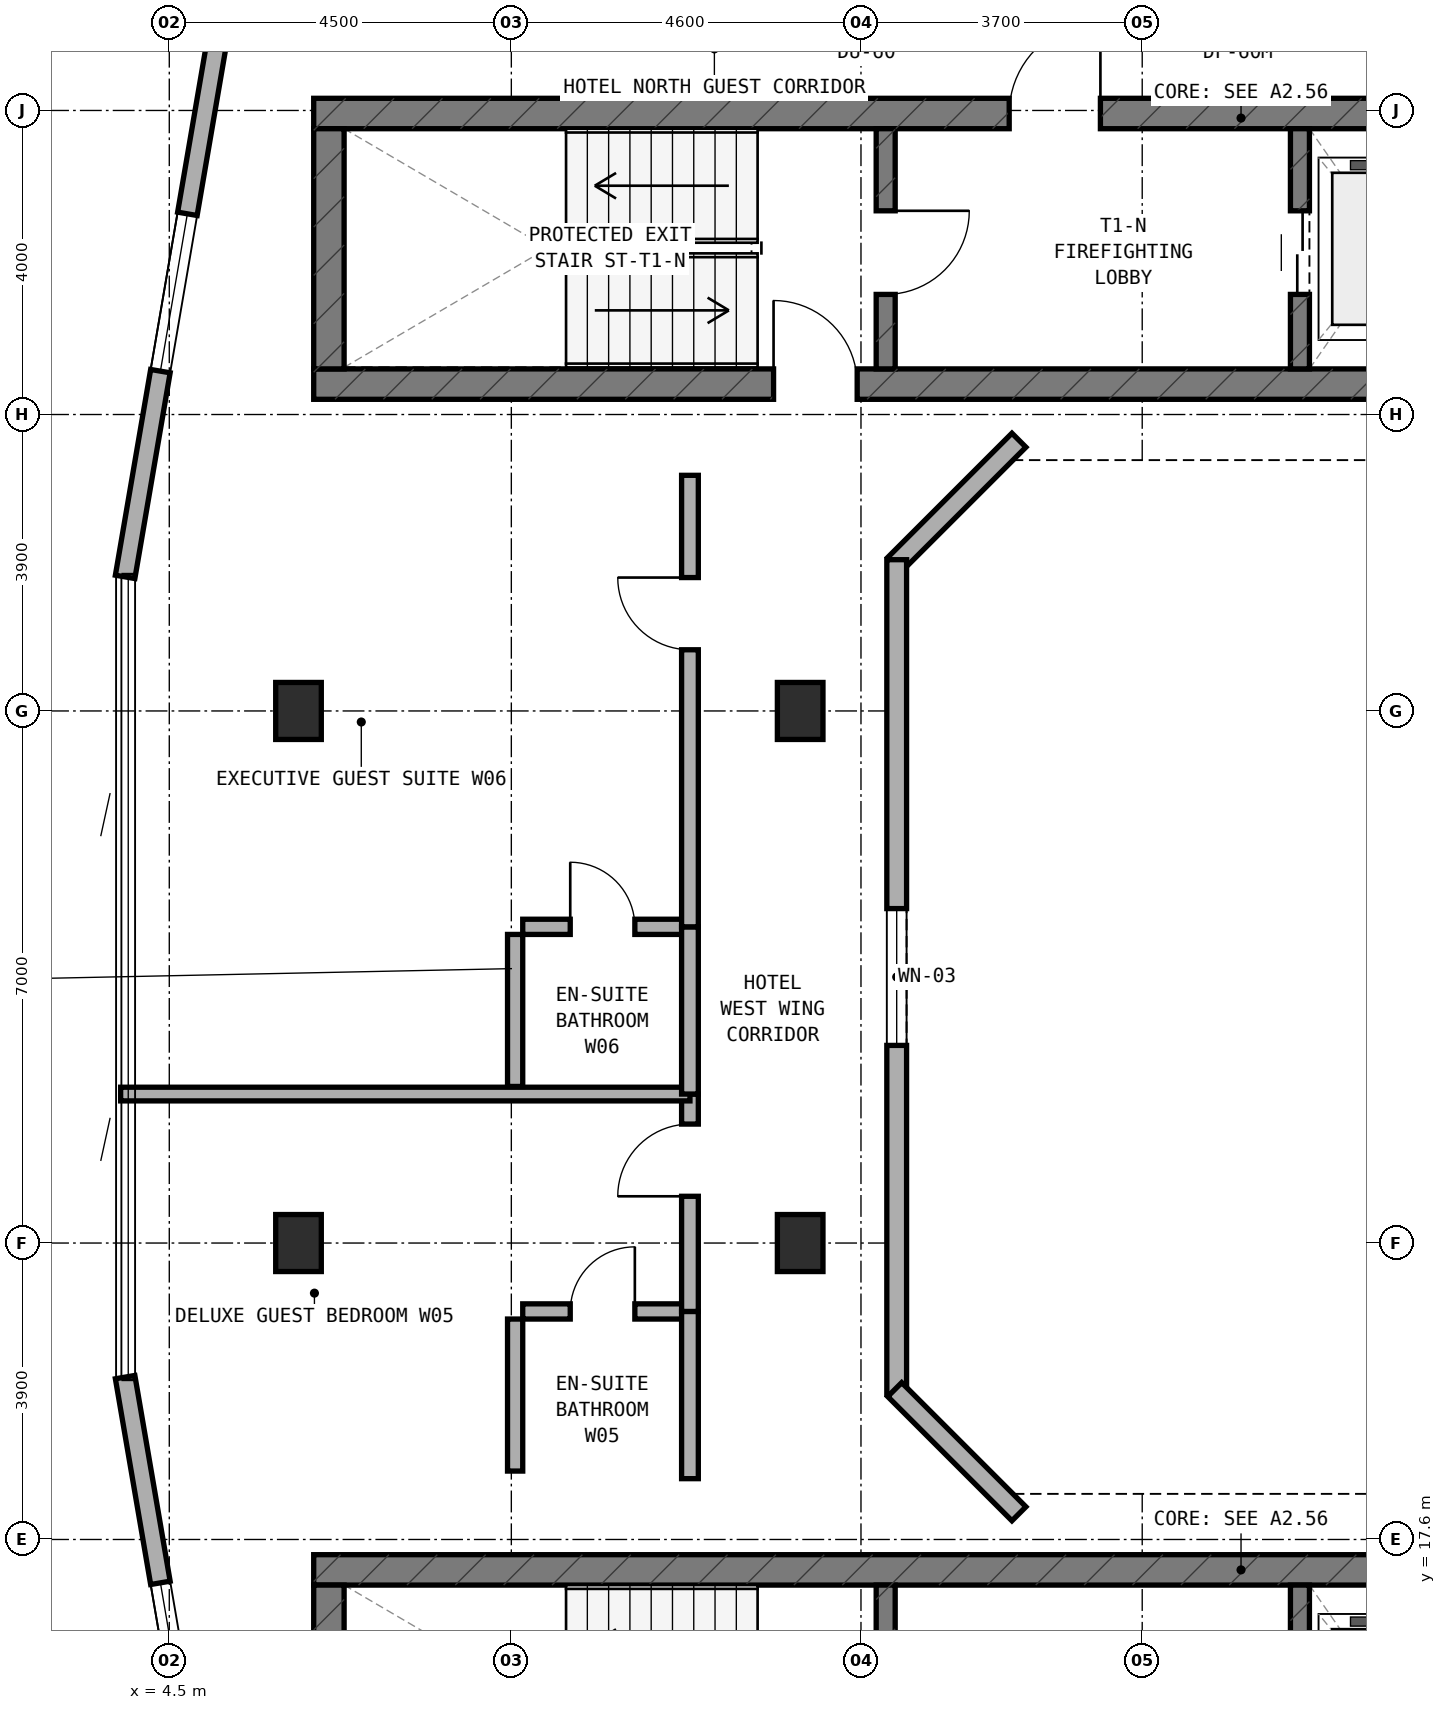
"""IFC4 building model, lengths in metres.
Left out: names, types, materials, properties, quantities, classifications, styles, units other than length and angle.
Written with IfcOpenShell. Run it as: python <this file> out.ifc"""

import sys

from ifc_helpers import new_model, si_unit, direction, frame, frame_2d, origin, origin_2d, place, context, subcontext, project, spatial, rectangle, extrude, element, fill, save


model = new_model("IFC4")
c1 = context("Model", 3, precision=1e-05, world=origin(), true_north=direction((0.0, 1.0)))
c2 = subcontext(c1, "Body", "Model", "MODEL_VIEW")
j1 = project(units=[si_unit("LENGTHUNIT", "METRE"), si_unit("PLANEANGLEUNIT", "RADIAN")], contexts=[c1])
p1 = place(None, origin())
s1 = spatial("IfcSite", under=j1, at=p1, CompositionType="ELEMENT")
p2 = place(p1, origin())
s2 = spatial("IfcBuilding", under=s1, at=p2, CompositionType="ELEMENT")
p3 = place(p2, frame((0.0, 0.0, 257.6)))
s3 = spatial("IfcBuildingStorey", under=s2, at=p3, CompositionType="ELEMENT", Elevation=257.6)
p4 = place(p3, frame((6.4, 32.8, 0.0), z_axis=(0.0, 0.0, 1.0), x_axis=(1.0, 0.0, 0.0)))
e1 = element("IfcWall", 1, at=p4, inside=s3, PredefinedType="SHEAR", context=c2, shape_type="SweptSolid", body=[
    extrude(rectangle(XDim=24.4, YDim=0.4, at=frame_2d((12.2, 0.0))), origin(), (0.0, 0.0, 1.0), 3.6),
])
p5 = place(p4, frame((6.05, 0.0, 0.0)))
e2 = element("IfcOpeningElement", 2, at=p5, cuts=e1, PredefinedType="OPENING", context=c2, shape_type="SweptSolid", body=[
    extrude(rectangle(XDim=1.1, YDim=2.15, at=frame_2d((0.55, 1.075))), frame((0.0, 0.21, 0.0), z_axis=(0.0, -1.0, 0.0), x_axis=(1.0, 0.0, 0.0)), (0.0, 0.0, 1.0), 0.42),
])
p6 = place(p3, frame((6.4, 36.36, 0.0), z_axis=(0.0, 0.0, 1.0), x_axis=(1.0, 0.0, 0.0)))
e3 = element("IfcWall", 3, at=p6, inside=s3, PredefinedType="SHEAR", context=c2, shape_type="SweptSolid", body=[
    extrude(rectangle(XDim=24.4, YDim=0.4, at=frame_2d((12.2, 0.0))), origin(), (0.0, 0.0, 1.0), 3.6),
])
p7 = place(p6, frame((9.15, 0.0, 0.0)))
e4 = element("IfcOpeningElement", 4, at=p7, cuts=e3, PredefinedType="OPENING", context=c2, shape_type="SweptSolid", body=[
    extrude(rectangle(XDim=1.2, YDim=2.15, at=frame_2d((0.6, 1.075))), frame((0.0, 0.21, 0.0), z_axis=(0.0, -1.0, 0.0), x_axis=(1.0, 0.0, 0.0)), (0.0, 0.0, 1.0), 0.42),
])
p8 = place(p6, frame((19.2, 0.0, 0.0)))
e5 = element("IfcOpeningElement", 5, at=p8, cuts=e3, PredefinedType="OPENING", context=c2, shape_type="SweptSolid", body=[
    extrude(rectangle(XDim=0.85, YDim=2.1, at=frame_2d((0.425, 1.05))), frame((0.0, 0.21, 0.0), z_axis=(0.0, -1.0, 0.0), x_axis=(1.0, 0.0, 0.0)), (0.0, 0.0, 1.0), 0.42),
])
p9 = place(p6, frame((16.94, 0.0, 0.0)))
e6 = element("IfcOpeningElement", 6, at=p9, cuts=e3, PredefinedType="OPENING", context=c2, shape_type="SweptSolid", body=[
    extrude(rectangle(XDim=0.85, YDim=2.1, at=frame_2d((0.425, 1.05))), frame((0.0, 0.21, 0.0), z_axis=(0.0, -1.0, 0.0), x_axis=(1.0, 0.0, 0.0)), (0.0, 0.0, 1.0), 0.42),
])
p10 = place(p3, frame((6.6, 33.0, 0.0), z_axis=(0.0, 0.0, 1.0), x_axis=(0.0, 1.0, 0.0)))
e7 = element("IfcWall", 7, at=p10, inside=s3, PredefinedType="SHEAR", context=c2, shape_type="SweptSolid", body=[
    extrude(rectangle(XDim=3.16, YDim=0.4, at=frame_2d((1.58, 0.0))), origin(), (0.0, 0.0, 1.0), 3.6),
])
p11 = place(p3, frame((13.925, 33.0, 0.0), z_axis=(0.0, 0.0, 1.0), x_axis=(0.0, 1.0, 0.0)))
e8 = element("IfcWall", 8, at=p11, inside=s3, PredefinedType="STANDARD", context=c2, shape_type="SweptSolid", body=[
    extrude(rectangle(XDim=3.16, YDim=0.25, at=frame_2d((1.58, 0.0))), origin(), (0.0, 0.0, 1.0), 3.32),
])
p12 = place(p11, frame((0.98, 0.0, 0.0)))
e9 = element("IfcOpeningElement", 9, at=p12, cuts=e8, PredefinedType="OPENING", context=c2, shape_type="SweptSolid", body=[
    extrude(rectangle(XDim=1.1, YDim=2.15, at=frame_2d((0.55, 1.075))), frame((0.0, 0.135, 0.0), z_axis=(0.0, -1.0, 0.0), x_axis=(1.0, 0.0, 0.0)), (0.0, 0.0, 1.0), 0.27),
])
p13 = place(p3, frame((19.375, 33.0, 0.0), z_axis=(0.0, 0.0, 1.0), x_axis=(0.0, 1.0, 0.0)))
e10 = element("IfcWall", 10, at=p13, inside=s3, PredefinedType="STANDARD", context=c2, shape_type="SweptSolid", body=[
    extrude(rectangle(XDim=3.16, YDim=0.25, at=frame_2d((1.58, 0.0))), origin(), (0.0, 0.0, 1.0), 3.32),
])
p14 = place(p13, frame((0.98, 0.0, 0.0)))
e11 = element("IfcOpeningElement", 11, at=p14, cuts=e10, PredefinedType="OPENING", context=c2, shape_type="SweptSolid", body=[
    extrude(rectangle(XDim=1.1, YDim=2.15, at=frame_2d((0.55, 1.075))), frame((0.0, 0.135, 0.0), z_axis=(0.0, -1.0, 0.0), x_axis=(1.0, 0.0, 0.0)), (0.0, 0.0, 1.0), 0.27),
])
p15 = place(p3, frame((6.4, 17.2, 0.0), z_axis=(0.0, 0.0, 1.0), x_axis=(1.0, 0.0, 0.0)))
e12 = element("IfcWall", 12, at=p15, inside=s3, PredefinedType="SHEAR", context=c2, shape_type="SweptSolid", body=[
    extrude(rectangle(XDim=24.4, YDim=0.4, at=frame_2d((12.2, 0.0))), origin(), (0.0, 0.0, 1.0), 3.6),
])
p16 = place(p3, frame((6.6, 13.84, 0.0), z_axis=(0.0, 0.0, 1.0), x_axis=(0.0, 1.0, 0.0)))
e13 = element("IfcWall", 13, at=p16, inside=s3, PredefinedType="SHEAR", context=c2, shape_type="SweptSolid", body=[
    extrude(rectangle(XDim=3.16, YDim=0.4, at=frame_2d((1.58, 0.0))), origin(), (0.0, 0.0, 1.0), 3.6),
])
p17 = place(p3, frame((13.925, 13.84, 0.0), z_axis=(0.0, 0.0, 1.0), x_axis=(0.0, 1.0, 0.0)))
e14 = element("IfcWall", 14, at=p17, inside=s3, PredefinedType="STANDARD", context=c2, shape_type="SweptSolid", body=[
    extrude(rectangle(XDim=3.16, YDim=0.25, at=frame_2d((1.58, 0.0))), origin(), (0.0, 0.0, 1.0), 3.32),
])
p18 = place(p17, frame((0.98, 0.0, 0.0)))
e15 = element("IfcOpeningElement", 15, at=p18, cuts=e14, PredefinedType="OPENING", context=c2, shape_type="SweptSolid", body=[
    extrude(rectangle(XDim=1.1, YDim=2.15, at=frame_2d((0.55, 1.075))), frame((0.0, 0.135, 0.0), z_axis=(0.0, -1.0, 0.0), x_axis=(1.0, 0.0, 0.0)), (0.0, 0.0, 1.0), 0.27),
])
p19 = place(p3, frame((19.375, 13.84, 0.0), z_axis=(0.0, 0.0, 1.0), x_axis=(0.0, 1.0, 0.0)))
e16 = element("IfcWall", 16, at=p19, inside=s3, PredefinedType="STANDARD", context=c2, shape_type="SweptSolid", body=[
    extrude(rectangle(XDim=3.16, YDim=0.25, at=frame_2d((1.58, 0.0))), origin(), (0.0, 0.0, 1.0), 3.32),
])
p20 = place(p19, frame((0.98, 0.0, 0.0)))
e17 = element("IfcOpeningElement", 17, at=p20, cuts=e16, PredefinedType="OPENING", context=c2, shape_type="SweptSolid", body=[
    extrude(rectangle(XDim=1.1, YDim=2.15, at=frame_2d((0.55, 1.075))), frame((0.0, 0.135, 0.0), z_axis=(0.0, -1.0, 0.0), x_axis=(1.0, 0.0, 0.0)), (0.0, 0.0, 1.0), 0.27),
])
for number, where, z_axis, x_axis in (
    (18, (6.2, 21.5, 0.0), (0.0, 0.0, 1.0), (1.0, 0.0, 0.0)),
    (19, (6.2, 28.5, 0.0), (0.0, 0.0, 1.0), (1.0, 0.0, 0.0)),
    (20, (12.8, 21.5, 0.0), (0.0, 0.0, 1.0), (1.0, 0.0, 0.0)),
    (21, (12.8, 28.5, 0.0), (0.0, 0.0, 1.0), (1.0, 0.0, 0.0)),
):
    element("IfcColumn", number, at=place(p3, frame(where, z_axis=z_axis, x_axis=x_axis)), inside=s3, PredefinedType="COLUMN", context=c2, shape_type="SweptSolid", body=[
        extrude(rectangle(XDim=0.6, YDim=0.75, at=origin_2d()), origin(), (0.0, 0.0, 1.0), 3.6),
    ])
p21 = place(p3, frame((5.329, 38.486, 0.0), z_axis=(0.0, 0.0, 1.0), x_axis=(-0.169038545376, -0.985609440994, 0.0)))
e22 = element("IfcWall", 22, at=p21, inside=s3, PredefinedType="STANDARD", context=c2, shape_type="SweptSolid", body=[
    extrude(rectangle(XDim=8.342, YDim=0.26, at=frame_2d((4.171, 0.0))), origin(), (0.0, 0.0, 1.0), 3.32),
])
p22 = place(p21, frame((3.496, 0.0, 0.85)))
e23 = element("IfcOpeningElement", 23, at=p22, cuts=e22, PredefinedType="OPENING", context=c2, shape_type="SweptSolid", body=[
    extrude(rectangle(XDim=2.1, YDim=1.5, at=frame_2d((1.05, 0.75))), frame((0.0, 0.14, 0.0), z_axis=(0.0, -1.0, 0.0), x_axis=(1.0, 0.0, 0.0)), (0.0, 0.0, 1.0), 0.28),
])
p23 = place(p3, frame((3.919, 19.736, 0.0), z_axis=(0.0, 0.0, 1.0), x_axis=(0.169038545376, -0.985609440994, 0.0)))
e24 = element("IfcWall", 24, at=p23, inside=s3, PredefinedType="STANDARD", context=c2, shape_type="SweptSolid", body=[
    extrude(rectangle(XDim=8.342, YDim=0.26, at=frame_2d((4.171, 0.0))), origin(), (0.0, 0.0, 1.0), 3.32),
])
p24 = place(p23, frame((2.746, 0.0, 0.85)))
e25 = element("IfcOpeningElement", 25, at=p24, cuts=e24, PredefinedType="OPENING", context=c2, shape_type="SweptSolid", body=[
    extrude(rectangle(XDim=2.1, YDim=1.5, at=frame_2d((1.05, 0.75))), frame((0.0, 0.14, 0.0), z_axis=(0.0, -1.0, 0.0), x_axis=(1.0, 0.0, 0.0)), (0.0, 0.0, 1.0), 0.28),
])
p25 = place(p3, frame((15.678, 32.062, 0.0), z_axis=(0.0, 0.0, 1.0), x_axis=(-0.707106781187, -0.707106781187, 0.0)))
e26 = element("IfcWall", 26, at=p25, inside=s3, PredefinedType="STANDARD", context=c2, shape_type="SweptSolid", body=[
    extrude(rectangle(XDim=2.311, YDim=0.26, at=frame_2d((1.155, 0.0))), origin(), (0.0, 0.0, 1.0), 3.32),
])
p26 = place(p3, frame((14.07, 30.49, 0.0), z_axis=(0.0, 0.0, 1.0), x_axis=(0.0, -1.0, 0.0)))
e27 = element("IfcWall", 27, at=p26, inside=s3, PredefinedType="STANDARD", context=c2, shape_type="SweptSolid", body=[
    extrude(rectangle(XDim=10.98, YDim=0.26, at=frame_2d((5.49, 0.0))), origin(), (0.0, 0.0, 1.0), 3.32),
])
p27 = place(p26, frame((4.59, 0.0, 0.85)))
e28 = element("IfcOpeningElement", 28, at=p27, cuts=e27, PredefinedType="OPENING", context=c2, shape_type="SweptSolid", body=[
    extrude(rectangle(XDim=1.8, YDim=1.5, at=frame_2d((0.9, 0.75))), frame((0.0, 0.14, 0.0), z_axis=(0.0, -1.0, 0.0), x_axis=(1.0, 0.0, 0.0)), (0.0, 0.0, 1.0), 0.28),
])
p28 = place(p3, frame((14.044, 19.572, 0.0), z_axis=(0.0, 0.0, 1.0), x_axis=(0.707106781187, -0.707106781187, 0.0)))
e29 = element("IfcWall", 29, at=p28, inside=s3, PredefinedType="STANDARD", context=c2, shape_type="SweptSolid", body=[
    extrude(rectangle(XDim=2.311, YDim=0.26, at=frame_2d((1.155, 0.0))), origin(), (0.0, 0.0, 1.0), 3.32),
])
p29 = place(p3, frame((9.15, 20.6, 0.0), z_axis=(0.0, 0.0, 1.0), x_axis=(1.0, 0.0, 0.0)))
e30 = element("IfcWall", 30, at=p29, inside=s3, PredefinedType="PLUMBINGWALL", context=c2, shape_type="SweptSolid", body=[
    extrude(rectangle(XDim=2.1, YDim=0.2, at=frame_2d((1.05, 0.0))), origin(), (0.0, 0.0, 1.0), 3.32),
])
p30 = place(p29, frame((0.625, 0.0, 0.0)))
e31 = element("IfcOpeningElement", 31, at=p30, cuts=e30, PredefinedType="OPENING", context=c2, shape_type="SweptSolid", body=[
    extrude(rectangle(XDim=0.85, YDim=2.1, at=frame_2d((0.425, 1.05))), frame((0.0, 0.11, 0.0), z_axis=(0.0, -1.0, 0.0), x_axis=(1.0, 0.0, 0.0)), (0.0, 0.0, 1.0), 0.22),
])
p31 = place(p3, frame((9.05, 18.5, 0.0), z_axis=(0.0, 0.0, 1.0), x_axis=(0.0, 1.0, 0.0)))
e32 = element("IfcWall", 32, at=p31, inside=s3, PredefinedType="PLUMBINGWALL", context=c2, shape_type="SweptSolid", body=[
    extrude(rectangle(XDim=2.0, YDim=0.2, at=frame_2d((1.0, 0.0))), origin(), (0.0, 0.0, 1.0), 3.32),
])
p32 = place(p3, frame((11.35, 18.4, 0.0), z_axis=(0.0, 0.0, 1.0), x_axis=(0.0, 1.0, 0.0)))
e33 = element("IfcWall", 33, at=p32, inside=s3, PredefinedType="SOLIDWALL", context=c2, shape_type="SweptSolid", body=[
    extrude(rectangle(XDim=2.2, YDim=0.22, at=frame_2d((1.1, 0.0))), origin(), (0.0, 0.0, 1.0), 3.32),
])
p33 = place(p3, frame((11.35, 20.6, 0.0), z_axis=(0.0, 0.0, 1.0), x_axis=(0.0, 1.0, 0.0)))
e34 = element("IfcWall", 34, at=p33, inside=s3, PredefinedType="SOLIDWALL", context=c2, shape_type="SweptSolid", body=[
    extrude(rectangle(XDim=2.86, YDim=0.22, at=frame_2d((1.43, 0.0))), origin(), (0.0, 0.0, 1.0), 2.795),
])
p34 = place(p33, frame((1.515, 0.0, 0.0)))
e35 = element("IfcOpeningElement", 35, at=p34, cuts=e34, PredefinedType="OPENING", context=c2, shape_type="SweptSolid", body=[
    extrude(rectangle(XDim=0.95, YDim=2.1, at=frame_2d((0.475, 1.05))), frame((0.0, 0.12, 0.0), z_axis=(0.0, -1.0, 0.0), x_axis=(1.0, 0.0, 0.0)), (0.0, 0.0, 1.0), 0.24),
])
p35 = place(p3, frame((3.86, 23.46, 0.0), z_axis=(0.0, 0.0, 1.0), x_axis=(1.0, 0.0, 0.0)))
e36 = element("IfcWall", 36, at=p35, inside=s3, PredefinedType="SOLIDWALL", context=c2, shape_type="SweptSolid", body=[
    extrude(rectangle(XDim=7.49, YDim=0.18, at=frame_2d((3.745, 0.0))), origin(), (0.0, 0.0, 1.0), 3.015),
])
p36 = place(p3, frame((9.15, 25.66, 0.0), z_axis=(0.0, 0.0, 1.0), x_axis=(1.0, 0.0, 0.0)))
e37 = element("IfcWall", 37, at=p36, inside=s3, PredefinedType="PLUMBINGWALL", context=c2, shape_type="SweptSolid", body=[
    extrude(rectangle(XDim=2.1, YDim=0.2, at=frame_2d((1.05, 0.0))), origin(), (0.0, 0.0, 1.0), 3.32),
])
p37 = place(p36, frame((0.625, 0.0, 0.0)))
e38 = element("IfcOpeningElement", 38, at=p37, cuts=e37, PredefinedType="OPENING", context=c2, shape_type="SweptSolid", body=[
    extrude(rectangle(XDim=0.85, YDim=2.1, at=frame_2d((0.425, 1.05))), frame((0.0, 0.11, 0.0), z_axis=(0.0, -1.0, 0.0), x_axis=(1.0, 0.0, 0.0)), (0.0, 0.0, 1.0), 0.22),
])
p38 = place(p3, frame((9.05, 23.56, 0.0), z_axis=(0.0, 0.0, 1.0), x_axis=(0.0, 1.0, 0.0)))
e39 = element("IfcWall", 39, at=p38, inside=s3, PredefinedType="PLUMBINGWALL", context=c2, shape_type="SweptSolid", body=[
    extrude(rectangle(XDim=2.0, YDim=0.2, at=frame_2d((1.0, 0.0))), origin(), (0.0, 0.0, 1.0), 3.32),
])
p39 = place(p3, frame((11.35, 23.46, 0.0), z_axis=(0.0, 0.0, 1.0), x_axis=(0.0, 1.0, 0.0)))
e40 = element("IfcWall", 40, at=p39, inside=s3, PredefinedType="SOLIDWALL", context=c2, shape_type="SweptSolid", body=[
    extrude(rectangle(XDim=2.2, YDim=0.22, at=frame_2d((1.1, 0.0))), origin(), (0.0, 0.0, 1.0), 3.32),
])
p40 = place(p3, frame((11.35, 25.66, 0.0), z_axis=(0.0, 0.0, 1.0), x_axis=(0.0, 1.0, 0.0)))
e41 = element("IfcWall", 41, at=p40, inside=s3, PredefinedType="SOLIDWALL", context=c2, shape_type="SweptSolid", body=[
    extrude(rectangle(XDim=5.94, YDim=0.22, at=frame_2d((2.97, 0.0))), origin(), (0.0, 0.0, 1.0), 2.795),
])
p41 = place(p40, frame((3.645, 0.0, 0.0)))
e42 = element("IfcOpeningElement", 42, at=p41, cuts=e41, PredefinedType="OPENING", context=c2, shape_type="SweptSolid", body=[
    extrude(rectangle(XDim=0.95, YDim=2.1, at=frame_2d((0.475, 1.05))), frame((0.0, 0.12, 0.0), z_axis=(0.0, -1.0, 0.0), x_axis=(1.0, 0.0, 0.0)), (0.0, 0.0, 1.0), 0.24),
])
p42 = place(p22, origin())
e43 = element("IfcWindow", 43, at=p42, inside=s3, PartitioningType="SINGLE_PANEL", PredefinedType="WINDOW", context=c2, shape_type="SweptSolid", body=[
    extrude(rectangle(XDim=2.1, YDim=1.5, at=frame_2d((1.05, 0.75))), frame((0.0, 0.03, 0.0), z_axis=(0.0, -1.0, 0.0), x_axis=(1.0, 0.0, 0.0)), (0.0, 0.0, 1.0), 0.06),
])
fill(e23, e43)
p43 = place(p24, origin())
e44 = element("IfcWindow", 44, at=p43, inside=s3, PartitioningType="SINGLE_PANEL", PredefinedType="WINDOW", context=c2, shape_type="SweptSolid", body=[
    extrude(rectangle(XDim=2.1, YDim=1.5, at=frame_2d((1.05, 0.75))), frame((0.0, 0.03, 0.0), z_axis=(0.0, -1.0, 0.0), x_axis=(1.0, 0.0, 0.0)), (0.0, 0.0, 1.0), 0.06),
])
fill(e25, e44)
p44 = place(p27, origin())
e45 = element("IfcWindow", 45, at=p44, inside=s3, PartitioningType="SINGLE_PANEL", PredefinedType="WINDOW", context=c2, shape_type="SweptSolid", body=[
    extrude(rectangle(XDim=1.8, YDim=1.5, at=frame_2d((0.9, 0.75))), frame((0.0, 0.03, 0.0), z_axis=(0.0, -1.0, 0.0), x_axis=(1.0, 0.0, 0.0)), (0.0, 0.0, 1.0), 0.06),
])
fill(e28, e45)
p45 = place(p12, frame((1.1, 0.0, 0.0), z_axis=(0.0, 0.0, 1.0), x_axis=(-1.0, 0.0, 0.0)))
e46 = element("IfcDoor", 46, at=p45, inside=s3, OperationType="SINGLE_SWING_LEFT", PredefinedType="DOOR", context=c2, shape_type="SweptSolid", body=[
    extrude(rectangle(XDim=1.1, YDim=2.15, at=frame_2d((0.55, 1.075))), frame((0.0, 0.025, 0.0), z_axis=(0.0, -1.0, 0.0), x_axis=(1.0, 0.0, 0.0)), (0.0, 0.0, 1.0), 0.05),
])
fill(e9, e46)
p46 = place(p7, origin())
e47 = element("IfcDoor", 47, at=p46, inside=s3, OperationType="SINGLE_SWING_RIGHT", PredefinedType="DOOR", context=c2, shape_type="SweptSolid", body=[
    extrude(rectangle(XDim=1.2, YDim=2.15, at=frame_2d((0.6, 1.075))), frame((0.0, 0.025, 0.0), z_axis=(0.0, -1.0, 0.0), x_axis=(1.0, 0.0, 0.0)), (0.0, 0.0, 1.0), 0.05),
])
fill(e4, e47)
p47 = place(p14, origin())
e48 = element("IfcDoor", 48, at=p47, inside=s3, OperationType="DOUBLE_DOOR_SLIDING", PredefinedType="DOOR", context=c2, shape_type="SweptSolid", body=[
    extrude(rectangle(XDim=1.1, YDim=2.15, at=frame_2d((0.55, 1.075))), frame((0.0, 0.025, 0.0), z_axis=(0.0, -1.0, 0.0), x_axis=(1.0, 0.0, 0.0)), (0.0, 0.0, 1.0), 0.05),
])
fill(e11, e48)
p48 = place(p5, origin())
e49 = element("IfcDoor", 49, at=p48, inside=s3, OperationType="SINGLE_SWING_LEFT", PredefinedType="DOOR", context=c2, shape_type="SweptSolid", body=[
    extrude(rectangle(XDim=1.1, YDim=2.15, at=frame_2d((0.55, 1.075))), frame((0.0, 0.025, 0.0), z_axis=(0.0, -1.0, 0.0), x_axis=(1.0, 0.0, 0.0)), (0.0, 0.0, 1.0), 0.05),
])
fill(e2, e49)
p49 = place(p30, origin())
e50 = element("IfcDoor", 50, at=p49, inside=s3, OperationType="SINGLE_SWING_RIGHT", PredefinedType="DOOR", context=c2, shape_type="SweptSolid", body=[
    extrude(rectangle(XDim=0.85, YDim=2.1, at=frame_2d((0.425, 1.05))), frame((0.0, 0.025, 0.0), z_axis=(0.0, -1.0, 0.0), x_axis=(1.0, 0.0, 0.0)), (0.0, 0.0, 1.0), 0.05),
])
fill(e31, e50)
p50 = place(p34, origin())
e51 = element("IfcDoor", 51, at=p50, inside=s3, OperationType="SINGLE_SWING_LEFT", PredefinedType="DOOR", context=c2, shape_type="SweptSolid", body=[
    extrude(rectangle(XDim=0.95, YDim=2.1, at=frame_2d((0.475, 1.05))), frame((0.0, 0.025, 0.0), z_axis=(0.0, -1.0, 0.0), x_axis=(1.0, 0.0, 0.0)), (0.0, 0.0, 1.0), 0.05),
])
fill(e35, e51)
p51 = place(p37, origin())
e52 = element("IfcDoor", 52, at=p51, inside=s3, OperationType="SINGLE_SWING_LEFT", PredefinedType="DOOR", context=c2, shape_type="SweptSolid", body=[
    extrude(rectangle(XDim=0.85, YDim=2.1, at=frame_2d((0.425, 1.05))), frame((0.0, 0.025, 0.0), z_axis=(0.0, -1.0, 0.0), x_axis=(1.0, 0.0, 0.0)), (0.0, 0.0, 1.0), 0.05),
])
fill(e38, e52)
p52 = place(p41, origin())
e53 = element("IfcDoor", 53, at=p52, inside=s3, OperationType="SINGLE_SWING_RIGHT", PredefinedType="DOOR", context=c2, shape_type="SweptSolid", body=[
    extrude(rectangle(XDim=0.95, YDim=2.1, at=frame_2d((0.475, 1.05))), frame((0.0, 0.025, 0.0), z_axis=(0.0, -1.0, 0.0), x_axis=(1.0, 0.0, 0.0)), (0.0, 0.0, 1.0), 0.05),
])
fill(e42, e53)
save(model, sys.argv[1])
